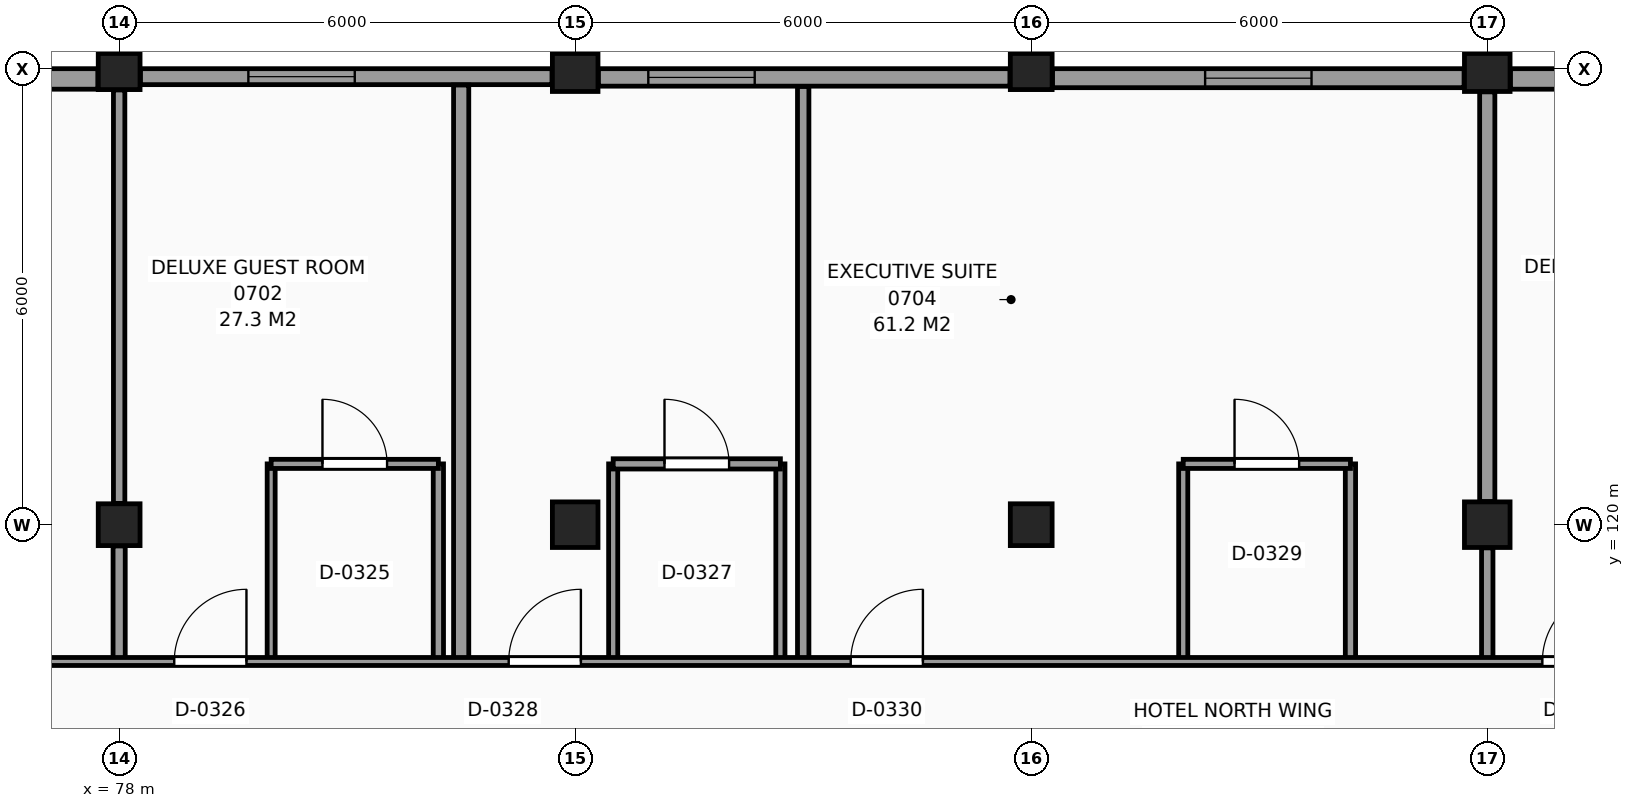
"""IFC4 building model, lengths in metres.
Left out: names, types, materials, properties, quantities, classifications, styles, units other than length and angle.
Written with IfcOpenShell. Run it as: python <this file> out.ifc"""

import sys

from ifc_helpers import new_model, si_unit, direction, frame, frame_2d, origin, origin_2d, place, context, subcontext, project, spatial, rectangle, extrude, element, fill, save


model = new_model("IFC4")
c1 = context("Model", 3, precision=1e-05, world=origin(), true_north=direction((0.0, 1.0)))
c2 = subcontext(c1, "Body", "Model", "MODEL_VIEW")
j1 = project(units=[si_unit("LENGTHUNIT", "METRE"), si_unit("PLANEANGLEUNIT", "RADIAN")], contexts=[c1])
p1 = place(None, origin())
s1 = spatial("IfcSite", under=j1, at=p1, CompositionType="ELEMENT")
p2 = place(p1, origin())
s2 = spatial("IfcBuilding", under=s1, at=p2, CompositionType="ELEMENT")
p3 = place(p2, frame((0.0, 0.0, 31.5)))
s3 = spatial("IfcBuildingStorey", under=s2, at=p3, CompositionType="ELEMENT", Elevation=31.5)
for number, where, z_axis, x_axis in (
    (1, (78.0, 120.0, 0.0), (0.0, 0.0, 1.0), (1.0, 0.0, 0.0)),
    (2, (78.0, 126.0, 0.0), (0.0, 0.0, 1.0), (1.0, 0.0, 0.0)),
):
    element("IfcColumn", number, at=place(p3, frame(where, z_axis=z_axis, x_axis=x_axis)), inside=s3, PredefinedType="COLUMN", context=c2, shape_type="SweptSolid", body=[
        extrude(rectangle(XDim=0.55, YDim=0.55, at=origin_2d()), origin(), (0.0, 0.0, 1.0), 3.3),
    ])
for number, where, z_axis, x_axis in (
    (3, (84.0, 120.0, 0.0), (0.0, 0.0, 1.0), (1.0, 0.0, 0.0)),
    (4, (84.0, 126.0, 0.0), (0.0, 0.0, 1.0), (1.0, 0.0, 0.0)),
):
    element("IfcColumn", number, at=place(p3, frame(where, z_axis=z_axis, x_axis=x_axis)), inside=s3, PredefinedType="COLUMN", context=c2, shape_type="SweptSolid", body=[
        extrude(rectangle(XDim=0.6, YDim=0.6, at=origin_2d()), origin(), (0.0, 0.0, 1.0), 3.3),
    ])
for number, where, z_axis, x_axis in (
    (5, (90.0, 120.0, 0.0), (0.0, 0.0, 1.0), (1.0, 0.0, 0.0)),
    (6, (90.0, 126.0, 0.0), (0.0, 0.0, 1.0), (1.0, 0.0, 0.0)),
):
    element("IfcColumn", number, at=place(p3, frame(where, z_axis=z_axis, x_axis=x_axis)), inside=s3, PredefinedType="COLUMN", context=c2, shape_type="SweptSolid", body=[
        extrude(rectangle(XDim=0.55, YDim=0.55, at=origin_2d()), origin(), (0.0, 0.0, 1.0), 3.3),
    ])
for number, where, z_axis, x_axis in (
    (7, (96.0, 120.0, 0.0), (0.0, 0.0, 1.0), (1.0, 0.0, 0.0)),
    (8, (96.0, 126.0, 0.0), (0.0, 0.0, 1.0), (1.0, 0.0, 0.0)),
):
    element("IfcColumn", number, at=place(p3, frame(where, z_axis=z_axis, x_axis=x_axis)), inside=s3, PredefinedType="COLUMN", context=c2, shape_type="SweptSolid", body=[
        extrude(rectangle(XDim=0.6, YDim=0.6, at=origin_2d()), origin(), (0.0, 0.0, 1.0), 3.3),
    ])
p4 = place(p3, frame((101.72, 125.865, 0.0), z_axis=(0.0, 0.0, 1.0), x_axis=(-1.0, 0.0, 0.0)))
e9 = element("IfcWall", 9, at=p4, inside=s3, PredefinedType="SOLIDWALL", context=c2, shape_type="SweptSolid", body=[
    extrude(rectangle(XDim=5.415, YDim=0.27, at=frame_2d((2.708, 0.0))), origin(), (0.0, 0.0, 1.0), 2.42),
])
p5 = place(p4, frame((2.608, 0.0, 0.8)))
e10 = element("IfcOpeningElement", 10, at=p5, cuts=e9, PredefinedType="OPENING", context=c2, shape_type="SweptSolid", body=[
    extrude(rectangle(XDim=1.4, YDim=1.4, at=frame_2d((0.7, 0.7))), frame((0.0, 0.145, 0.0), z_axis=(0.0, -1.0, 0.0), x_axis=(1.0, 0.0, 0.0)), (0.0, 0.0, 1.0), 0.29),
])
p6 = place(p3, frame((95.695, 125.875, 0.0), z_axis=(0.0, 0.0, 1.0), x_axis=(-1.0, 0.0, 0.0)))
e11 = element("IfcWall", 11, at=p6, inside=s3, PredefinedType="SOLIDWALL", context=c2, shape_type="SweptSolid", body=[
    extrude(rectangle(XDim=5.415, YDim=0.25, at=frame_2d((2.708, 0.0))), origin(), (0.0, 0.0, 1.0), 2.42),
])
p7 = place(p6, frame((2.007, 0.0, 0.8)))
e12 = element("IfcOpeningElement", 12, at=p7, cuts=e11, PredefinedType="OPENING", context=c2, shape_type="SweptSolid", body=[
    extrude(rectangle(XDim=1.4, YDim=1.4, at=frame_2d((0.7, 0.7))), frame((0.0, 0.135, 0.0), z_axis=(0.0, -1.0, 0.0), x_axis=(1.0, 0.0, 0.0)), (0.0, 0.0, 1.0), 0.27),
])
p8 = place(p3, frame((89.72, 125.885, 0.0), z_axis=(0.0, 0.0, 1.0), x_axis=(-1.0, 0.0, 0.0)))
e13 = element("IfcWall", 13, at=p8, inside=s3, PredefinedType="SOLIDWALL", context=c2, shape_type="SweptSolid", body=[
    extrude(rectangle(XDim=5.415, YDim=0.23, at=frame_2d((2.708, 0.0))), origin(), (0.0, 0.0, 1.0), 2.42),
])
p9 = place(p8, frame((3.358, 0.0, 0.8)))
e14 = element("IfcOpeningElement", 14, at=p9, cuts=e13, PredefinedType="OPENING", context=c2, shape_type="SweptSolid", body=[
    extrude(rectangle(XDim=1.4, YDim=1.4, at=frame_2d((0.7, 0.7))), frame((0.0, 0.125, 0.0), z_axis=(0.0, -1.0, 0.0), x_axis=(1.0, 0.0, 0.0)), (0.0, 0.0, 1.0), 0.25),
])
p10 = place(p3, frame((83.695, 125.895, 0.0), z_axis=(0.0, 0.0, 1.0), x_axis=(-1.0, 0.0, 0.0)))
e15 = element("IfcWall", 15, at=p10, inside=s3, PredefinedType="SOLIDWALL", context=c2, shape_type="SweptSolid", body=[
    extrude(rectangle(XDim=5.415, YDim=0.21, at=frame_2d((2.708, 0.0))), origin(), (0.0, 0.0, 1.0), 2.42),
])
p11 = place(p10, frame((2.595, 0.0, 0.8)))
e16 = element("IfcOpeningElement", 16, at=p11, cuts=e15, PredefinedType="OPENING", context=c2, shape_type="SweptSolid", body=[
    extrude(rectangle(XDim=1.4, YDim=1.4, at=frame_2d((0.7, 0.7))), frame((0.0, 0.115, 0.0), z_axis=(0.0, -1.0, 0.0), x_axis=(1.0, 0.0, 0.0)), (0.0, 0.0, 1.0), 0.23),
])
p12 = place(p3, frame((77.72, 125.865, 0.0), z_axis=(0.0, 0.0, 1.0), x_axis=(-1.0, 0.0, 0.0)))
e17 = element("IfcWall", 17, at=p12, inside=s3, PredefinedType="SOLIDWALL", context=c2, shape_type="SweptSolid", body=[
    extrude(rectangle(XDim=5.415, YDim=0.27, at=frame_2d((2.708, 0.0))), origin(), (0.0, 0.0, 1.0), 2.42),
])
p13 = place(p12, frame((2.007, 0.0, 0.8)))
e18 = element("IfcOpeningElement", 18, at=p13, cuts=e17, PredefinedType="OPENING", context=c2, shape_type="SweptSolid", body=[
    extrude(rectangle(XDim=1.4, YDim=1.4, at=frame_2d((0.7, 0.7))), frame((0.0, 0.145, 0.0), z_axis=(0.0, -1.0, 0.0), x_axis=(1.0, 0.0, 0.0)), (0.0, 0.0, 1.0), 0.29),
])
p14 = place(p3, frame((78.0, 118.2, 0.0), z_axis=(0.0, 0.0, 1.0), x_axis=(0.0, 1.0, 0.0)))
e19 = element("IfcWall", 19, at=p14, inside=s3, PredefinedType="PARTITIONING", context=c2, shape_type="SweptSolid", body=[
    extrude(rectangle(XDim=1.52, YDim=0.16, at=frame_2d((0.76, 0.0))), origin(), (0.0, 0.0, 1.0), 2.52),
])
p15 = place(p3, frame((78.0, 120.28, 0.0), z_axis=(0.0, 0.0, 1.0), x_axis=(0.0, 1.0, 0.0)))
e20 = element("IfcWall", 20, at=p15, inside=s3, PredefinedType="PARTITIONING", context=c2, shape_type="SweptSolid", body=[
    extrude(rectangle(XDim=5.44, YDim=0.15, at=frame_2d((2.72, 0.0))), origin(), (0.0, 0.0, 1.0), 2.57),
])
p16 = place(p3, frame((80.0, 118.2, 0.0), z_axis=(0.0, 0.0, 1.0), x_axis=(0.0, 1.0, 0.0)))
e21 = element("IfcWall", 21, at=p16, inside=s3, PredefinedType="PARTITIONING", context=c2, shape_type="SweptSolid", body=[
    extrude(rectangle(XDim=2.6, YDim=0.105, at=frame_2d((1.3, 0.0))), origin(), (0.0, 0.0, 1.0), 3.07),
])
p17 = place(p3, frame((82.2, 118.2, 0.0), z_axis=(0.0, 0.0, 1.0), x_axis=(0.0, 1.0, 0.0)))
e22 = element("IfcWall", 22, at=p17, inside=s3, PredefinedType="PARTITIONING", context=c2, shape_type="SweptSolid", body=[
    extrude(rectangle(XDim=2.6, YDim=0.135, at=frame_2d((1.3, 0.0))), origin(), (0.0, 0.0, 1.0), 3.07),
])
p18 = place(p3, frame((82.5, 118.2, 0.0), z_axis=(0.0, 0.0, 1.0), x_axis=(0.0, 1.0, 0.0)))
e23 = element("IfcWall", 23, at=p18, inside=s3, PredefinedType="PARTITIONING", context=c2, shape_type="SweptSolid", body=[
    extrude(rectangle(XDim=7.585, YDim=0.2, at=frame_2d((3.792, 0.0))), origin(), (0.0, 0.0, 1.0), 3.07),
])
for number, where, z_axis, x_axis in (
    (24, (84.5, 118.2, 0.0), (0.0, 0.0, 1.0), (0.0, 1.0, 0.0)),
    (25, (86.7, 118.2, 0.0), (0.0, 0.0, 1.0), (0.0, 1.0, 0.0)),
):
    element("IfcWall", number, at=place(p3, frame(where, z_axis=z_axis, x_axis=x_axis)), inside=s3, PredefinedType="PARTITIONING", context=c2, shape_type="SweptSolid", body=[
        extrude(rectangle(XDim=2.6, YDim=0.12, at=frame_2d((1.3, 0.0))), origin(), (0.0, 0.0, 1.0), 3.07),
    ])
p19 = place(p3, frame((87.0, 118.2, 0.0), z_axis=(0.0, 0.0, 1.0), x_axis=(0.0, 1.0, 0.0)))
e26 = element("IfcWall", 26, at=p19, inside=s3, PredefinedType="PARTITIONING", context=c2, shape_type="SweptSolid", body=[
    extrude(rectangle(XDim=7.565, YDim=0.15, at=frame_2d((3.782, 0.0))), origin(), (0.0, 0.0, 1.0), 3.07),
])
p20 = place(p3, frame((92.0, 118.2, 0.0), z_axis=(0.0, 0.0, 1.0), x_axis=(0.0, 1.0, 0.0)))
e27 = element("IfcWall", 27, at=p20, inside=s3, PredefinedType="PARTITIONING", context=c2, shape_type="SweptSolid", body=[
    extrude(rectangle(XDim=2.6, YDim=0.12, at=frame_2d((1.3, 0.0))), origin(), (0.0, 0.0, 1.0), 3.07),
])
p21 = place(p3, frame((94.2, 118.2, 0.0), z_axis=(0.0, 0.0, 1.0), x_axis=(0.0, 1.0, 0.0)))
e28 = element("IfcWall", 28, at=p21, inside=s3, PredefinedType="PARTITIONING", context=c2, shape_type="SweptSolid", body=[
    extrude(rectangle(XDim=2.6, YDim=0.135, at=frame_2d((1.3, 0.0))), origin(), (0.0, 0.0, 1.0), 3.07),
])
p22 = place(p3, frame((96.0, 118.2, 0.0), z_axis=(0.0, 0.0, 1.0), x_axis=(0.0, 1.0, 0.0)))
e29 = element("IfcWall", 29, at=p22, inside=s3, PredefinedType="PARTITIONING", context=c2, shape_type="SweptSolid", body=[
    extrude(rectangle(XDim=1.495, YDim=0.15, at=frame_2d((0.748, 0.0))), origin(), (0.0, 0.0, 1.0), 2.27),
])
p23 = place(p3, frame((96.0, 120.305, 0.0), z_axis=(0.0, 0.0, 1.0), x_axis=(0.0, 1.0, 0.0)))
e30 = element("IfcWall", 30, at=p23, inside=s3, PredefinedType="PARTITIONING", context=c2, shape_type="SweptSolid", body=[
    extrude(rectangle(XDim=5.39, YDim=0.2, at=frame_2d((2.695, 0.0))), origin(), (0.0, 0.0, 1.0), 2.27),
])
p24 = place(p3, frame((66.215, 118.2, 0.0), z_axis=(0.0, 0.0, 1.0), x_axis=(1.0, 0.0, 0.0)))
e31 = element("IfcWall", 31, at=p24, inside=s3, PredefinedType="PARTITIONING", context=c2, shape_type="SweptSolid", body=[
    extrude(rectangle(XDim=110.285, YDim=0.105, at=frame_2d((55.143, 0.0))), origin(), (0.0, 0.0, 1.0), 3.07),
])
p25 = place(p24, frame((8.36, 0.0, 0.0)))
e32 = element("IfcOpeningElement", 32, at=p25, cuts=e31, PredefinedType="OPENING", context=c2, shape_type="SweptSolid", body=[
    extrude(rectangle(XDim=0.95, YDim=2.1, at=frame_2d((0.475, 1.05))), frame((0.0, 0.062, 0.0), z_axis=(0.0, -1.0, 0.0), x_axis=(1.0, 0.0, 0.0)), (0.0, 0.0, 1.0), 0.125),
])
p26 = place(p24, frame((12.51, 0.0, 0.0)))
e33 = element("IfcOpeningElement", 33, at=p26, cuts=e31, PredefinedType="OPENING", context=c2, shape_type="SweptSolid", body=[
    extrude(rectangle(XDim=0.95, YDim=2.1, at=frame_2d((0.475, 1.05))), frame((0.0, 0.062, 0.0), z_axis=(0.0, -1.0, 0.0), x_axis=(1.0, 0.0, 0.0)), (0.0, 0.0, 1.0), 0.125),
])
p27 = place(p24, frame((16.91, 0.0, 0.0)))
e34 = element("IfcOpeningElement", 34, at=p27, cuts=e31, PredefinedType="OPENING", context=c2, shape_type="SweptSolid", body=[
    extrude(rectangle(XDim=0.95, YDim=2.1, at=frame_2d((0.475, 1.05))), frame((0.0, 0.062, 0.0), z_axis=(0.0, -1.0, 0.0), x_axis=(1.0, 0.0, 0.0)), (0.0, 0.0, 1.0), 0.125),
])
p28 = place(p24, frame((21.41, 0.0, 0.0)))
e35 = element("IfcOpeningElement", 35, at=p28, cuts=e31, PredefinedType="OPENING", context=c2, shape_type="SweptSolid", body=[
    extrude(rectangle(XDim=0.95, YDim=2.1, at=frame_2d((0.475, 1.05))), frame((0.0, 0.062, 0.0), z_axis=(0.0, -1.0, 0.0), x_axis=(1.0, 0.0, 0.0)), (0.0, 0.0, 1.0), 0.125),
])
p29 = place(p24, frame((30.51, 0.0, 0.0)))
e36 = element("IfcOpeningElement", 36, at=p29, cuts=e31, PredefinedType="OPENING", context=c2, shape_type="SweptSolid", body=[
    extrude(rectangle(XDim=0.95, YDim=2.1, at=frame_2d((0.475, 1.05))), frame((0.0, 0.062, 0.0), z_axis=(0.0, -1.0, 0.0), x_axis=(1.0, 0.0, 0.0)), (0.0, 0.0, 1.0), 0.125),
])
p30 = place(p24, frame((34.91, 0.0, 0.0)))
e37 = element("IfcOpeningElement", 37, at=p30, cuts=e31, PredefinedType="OPENING", context=c2, shape_type="SweptSolid", body=[
    extrude(rectangle(XDim=0.95, YDim=2.1, at=frame_2d((0.475, 1.05))), frame((0.0, 0.062, 0.0), z_axis=(0.0, -1.0, 0.0), x_axis=(1.0, 0.0, 0.0)), (0.0, 0.0, 1.0), 0.125),
])
p31 = place(p24, frame((42.11, 0.0, 0.0)))
e38 = element("IfcOpeningElement", 38, at=p31, cuts=e31, PredefinedType="OPENING", context=c2, shape_type="SweptSolid", body=[
    extrude(rectangle(XDim=0.95, YDim=2.1, at=frame_2d((0.475, 1.05))), frame((0.0, 0.062, 0.0), z_axis=(0.0, -1.0, 0.0), x_axis=(1.0, 0.0, 0.0)), (0.0, 0.0, 1.0), 0.125),
])
p32 = place(p24, frame((50.36, 0.0, 0.0)))
e39 = element("IfcOpeningElement", 39, at=p32, cuts=e31, PredefinedType="OPENING", context=c2, shape_type="SweptSolid", body=[
    extrude(rectangle(XDim=0.95, YDim=2.1, at=frame_2d((0.475, 1.05))), frame((0.0, 0.062, 0.0), z_axis=(0.0, -1.0, 0.0), x_axis=(1.0, 0.0, 0.0)), (0.0, 0.0, 1.0), 0.125),
])
p33 = place(p24, frame((62.36, 0.0, 0.0)))
e40 = element("IfcOpeningElement", 40, at=p33, cuts=e31, PredefinedType="OPENING", context=c2, shape_type="SweptSolid", body=[
    extrude(rectangle(XDim=0.95, YDim=2.1, at=frame_2d((0.475, 1.05))), frame((0.0, 0.062, 0.0), z_axis=(0.0, -1.0, 0.0), x_axis=(1.0, 0.0, 0.0)), (0.0, 0.0, 1.0), 0.125),
])
p34 = place(p24, frame((64.91, 0.0, 0.0)))
e41 = element("IfcOpeningElement", 41, at=p34, cuts=e31, PredefinedType="OPENING", context=c2, shape_type="SweptSolid", body=[
    extrude(rectangle(XDim=0.95, YDim=2.1, at=frame_2d((0.475, 1.05))), frame((0.0, 0.062, 0.0), z_axis=(0.0, -1.0, 0.0), x_axis=(1.0, 0.0, 0.0)), (0.0, 0.0, 1.0), 0.125),
])
p35 = place(p24, frame((72.11, 0.0, 0.0)))
e42 = element("IfcOpeningElement", 42, at=p35, cuts=e31, PredefinedType="OPENING", context=c2, shape_type="SweptSolid", body=[
    extrude(rectangle(XDim=0.95, YDim=2.1, at=frame_2d((0.475, 1.05))), frame((0.0, 0.062, 0.0), z_axis=(0.0, -1.0, 0.0), x_axis=(1.0, 0.0, 0.0)), (0.0, 0.0, 1.0), 0.125),
])
p36 = place(p24, frame((76.31, 0.0, 0.0)))
e43 = element("IfcOpeningElement", 43, at=p36, cuts=e31, PredefinedType="OPENING", context=c2, shape_type="SweptSolid", body=[
    extrude(rectangle(XDim=0.95, YDim=2.1, at=frame_2d((0.475, 1.05))), frame((0.0, 0.062, 0.0), z_axis=(0.0, -1.0, 0.0), x_axis=(1.0, 0.0, 0.0)), (0.0, 0.0, 1.0), 0.125),
])
p37 = place(p24, frame((78.51, 0.0, 0.0)))
e44 = element("IfcOpeningElement", 44, at=p37, cuts=e31, PredefinedType="OPENING", context=c2, shape_type="SweptSolid", body=[
    extrude(rectangle(XDim=0.95, YDim=2.1, at=frame_2d((0.475, 1.05))), frame((0.0, 0.062, 0.0), z_axis=(0.0, -1.0, 0.0), x_axis=(1.0, 0.0, 0.0)), (0.0, 0.0, 1.0), 0.125),
])
p38 = place(p24, frame((84.51, 0.0, 0.0)))
e45 = element("IfcOpeningElement", 45, at=p38, cuts=e31, PredefinedType="OPENING", context=c2, shape_type="SweptSolid", body=[
    extrude(rectangle(XDim=0.95, YDim=2.1, at=frame_2d((0.475, 1.05))), frame((0.0, 0.062, 0.0), z_axis=(0.0, -1.0, 0.0), x_axis=(1.0, 0.0, 0.0)), (0.0, 0.0, 1.0), 0.125),
])
p39 = place(p24, frame((98.36, 0.0, 0.0)))
e46 = element("IfcOpeningElement", 46, at=p39, cuts=e31, PredefinedType="OPENING", context=c2, shape_type="SweptSolid", body=[
    extrude(rectangle(XDim=0.95, YDim=2.1, at=frame_2d((0.475, 1.05))), frame((0.0, 0.062, 0.0), z_axis=(0.0, -1.0, 0.0), x_axis=(1.0, 0.0, 0.0)), (0.0, 0.0, 1.0), 0.125),
])
p40 = place(p24, frame((104.26, 0.0, 0.0)))
e47 = element("IfcOpeningElement", 47, at=p40, cuts=e31, PredefinedType="OPENING", context=c2, shape_type="SweptSolid", body=[
    extrude(rectangle(XDim=0.95, YDim=2.1, at=frame_2d((0.475, 1.05))), frame((0.0, 0.062, 0.0), z_axis=(0.0, -1.0, 0.0), x_axis=(1.0, 0.0, 0.0)), (0.0, 0.0, 1.0), 0.125),
])
p41 = place(p3, frame((80.0, 120.8, 0.0), z_axis=(0.0, 0.0, 1.0), x_axis=(1.0, 0.0, 0.0)))
e48 = element("IfcWall", 48, at=p41, inside=s3, PredefinedType="PARTITIONING", context=c2, shape_type="SweptSolid", body=[
    extrude(rectangle(XDim=2.2, YDim=0.12, at=frame_2d((1.1, 0.0))), origin(), (0.0, 0.0, 1.0), 3.07),
])
p42 = place(p41, frame((0.675, 0.0, 0.0)))
e49 = element("IfcOpeningElement", 49, at=p42, cuts=e48, PredefinedType="OPENING", context=c2, shape_type="SweptSolid", body=[
    extrude(rectangle(XDim=0.85, YDim=2.1, at=frame_2d((0.425, 1.05))), frame((0.0, 0.07, 0.0), z_axis=(0.0, -1.0, 0.0), x_axis=(1.0, 0.0, 0.0)), (0.0, 0.0, 1.0), 0.14),
])
p43 = place(p3, frame((84.5, 120.8, 0.0), z_axis=(0.0, 0.0, 1.0), x_axis=(1.0, 0.0, 0.0)))
e50 = element("IfcWall", 50, at=p43, inside=s3, PredefinedType="PARTITIONING", context=c2, shape_type="SweptSolid", body=[
    extrude(rectangle(XDim=2.2, YDim=0.135, at=frame_2d((1.1, 0.0))), origin(), (0.0, 0.0, 1.0), 3.07),
])
p44 = place(p43, frame((0.675, 0.0, 0.0)))
e51 = element("IfcOpeningElement", 51, at=p44, cuts=e50, PredefinedType="OPENING", context=c2, shape_type="SweptSolid", body=[
    extrude(rectangle(XDim=0.85, YDim=2.1, at=frame_2d((0.425, 1.05))), frame((0.0, 0.078, 0.0), z_axis=(0.0, -1.0, 0.0), x_axis=(1.0, 0.0, 0.0)), (0.0, 0.0, 1.0), 0.155),
])
p45 = place(p3, frame((92.0, 120.8, 0.0), z_axis=(0.0, 0.0, 1.0), x_axis=(1.0, 0.0, 0.0)))
e52 = element("IfcWall", 52, at=p45, inside=s3, PredefinedType="PARTITIONING", context=c2, shape_type="SweptSolid", body=[
    extrude(rectangle(XDim=2.2, YDim=0.12, at=frame_2d((1.1, 0.0))), origin(), (0.0, 0.0, 1.0), 3.07),
])
p46 = place(p45, frame((0.675, 0.0, 0.0)))
e53 = element("IfcOpeningElement", 53, at=p46, cuts=e52, PredefinedType="OPENING", context=c2, shape_type="SweptSolid", body=[
    extrude(rectangle(XDim=0.85, YDim=2.1, at=frame_2d((0.425, 1.05))), frame((0.0, 0.07, 0.0), z_axis=(0.0, -1.0, 0.0), x_axis=(1.0, 0.0, 0.0)), (0.0, 0.0, 1.0), 0.14),
])
p47 = place(p11, origin())
e54 = element("IfcWindow", 54, at=p47, inside=s3, PartitioningType="SINGLE_PANEL", PredefinedType="WINDOW", context=c2, shape_type="SweptSolid", body=[
    extrude(rectangle(XDim=1.4, YDim=1.4, at=frame_2d((0.7, 0.7))), frame((0.0, 0.03, 0.0), z_axis=(0.0, -1.0, 0.0), x_axis=(1.0, 0.0, 0.0)), (0.0, 0.0, 1.0), 0.06),
])
fill(e16, e54)
p48 = place(p9, origin())
e55 = element("IfcWindow", 55, at=p48, inside=s3, PartitioningType="SINGLE_PANEL", PredefinedType="WINDOW", context=c2, shape_type="SweptSolid", body=[
    extrude(rectangle(XDim=1.4, YDim=1.4, at=frame_2d((0.7, 0.7))), frame((0.0, 0.03, 0.0), z_axis=(0.0, -1.0, 0.0), x_axis=(1.0, 0.0, 0.0)), (0.0, 0.0, 1.0), 0.06),
])
fill(e14, e55)
p49 = place(p7, origin())
e56 = element("IfcWindow", 56, at=p49, inside=s3, PartitioningType="SINGLE_PANEL", PredefinedType="WINDOW", context=c2, shape_type="SweptSolid", body=[
    extrude(rectangle(XDim=1.4, YDim=1.4, at=frame_2d((0.7, 0.7))), frame((0.0, 0.03, 0.0), z_axis=(0.0, -1.0, 0.0), x_axis=(1.0, 0.0, 0.0)), (0.0, 0.0, 1.0), 0.06),
])
fill(e12, e56)
p50 = place(p42, origin())
e57 = element("IfcDoor", 57, at=p50, inside=s3, OperationType="SINGLE_SWING_LEFT", PredefinedType="DOOR", context=c2, shape_type="SweptSolid", body=[
    extrude(rectangle(XDim=0.85, YDim=2.1, at=frame_2d((0.425, 1.05))), frame((0.0, 0.025, 0.0), z_axis=(0.0, -1.0, 0.0), x_axis=(1.0, 0.0, 0.0)), (0.0, 0.0, 1.0), 0.05),
])
fill(e49, e57)
p51 = place(p26, origin())
e58 = element("IfcDoor", 58, at=p51, inside=s3, OperationType="SINGLE_SWING_RIGHT", PredefinedType="DOOR", context=c2, shape_type="SweptSolid", body=[
    extrude(rectangle(XDim=0.95, YDim=2.1, at=frame_2d((0.475, 1.05))), frame((0.0, 0.025, 0.0), z_axis=(0.0, -1.0, 0.0), x_axis=(1.0, 0.0, 0.0)), (0.0, 0.0, 1.0), 0.05),
])
fill(e33, e58)
p52 = place(p44, origin())
e59 = element("IfcDoor", 59, at=p52, inside=s3, OperationType="SINGLE_SWING_LEFT", PredefinedType="DOOR", context=c2, shape_type="SweptSolid", body=[
    extrude(rectangle(XDim=0.85, YDim=2.1, at=frame_2d((0.425, 1.05))), frame((0.0, 0.025, 0.0), z_axis=(0.0, -1.0, 0.0), x_axis=(1.0, 0.0, 0.0)), (0.0, 0.0, 1.0), 0.05),
])
fill(e51, e59)
p53 = place(p27, origin())
e60 = element("IfcDoor", 60, at=p53, inside=s3, OperationType="SINGLE_SWING_RIGHT", PredefinedType="DOOR", context=c2, shape_type="SweptSolid", body=[
    extrude(rectangle(XDim=0.95, YDim=2.1, at=frame_2d((0.475, 1.05))), frame((0.0, 0.025, 0.0), z_axis=(0.0, -1.0, 0.0), x_axis=(1.0, 0.0, 0.0)), (0.0, 0.0, 1.0), 0.05),
])
fill(e34, e60)
p54 = place(p46, origin())
e61 = element("IfcDoor", 61, at=p54, inside=s3, OperationType="SINGLE_SWING_LEFT", PredefinedType="DOOR", context=c2, shape_type="SweptSolid", body=[
    extrude(rectangle(XDim=0.85, YDim=2.1, at=frame_2d((0.425, 1.05))), frame((0.0, 0.025, 0.0), z_axis=(0.0, -1.0, 0.0), x_axis=(1.0, 0.0, 0.0)), (0.0, 0.0, 1.0), 0.05),
])
fill(e53, e61)
p55 = place(p28, origin())
e62 = element("IfcDoor", 62, at=p55, inside=s3, OperationType="SINGLE_SWING_RIGHT", PredefinedType="DOOR", context=c2, shape_type="SweptSolid", body=[
    extrude(rectangle(XDim=0.95, YDim=2.1, at=frame_2d((0.475, 1.05))), frame((0.0, 0.025, 0.0), z_axis=(0.0, -1.0, 0.0), x_axis=(1.0, 0.0, 0.0)), (0.0, 0.0, 1.0), 0.05),
])
fill(e35, e62)
p56 = place(p29, origin())
e63 = element("IfcDoor", 63, at=p56, inside=s3, OperationType="SINGLE_SWING_RIGHT", PredefinedType="DOOR", context=c2, shape_type="SweptSolid", body=[
    extrude(rectangle(XDim=0.95, YDim=2.1, at=frame_2d((0.475, 1.05))), frame((0.0, 0.025, 0.0), z_axis=(0.0, -1.0, 0.0), x_axis=(1.0, 0.0, 0.0)), (0.0, 0.0, 1.0), 0.05),
])
fill(e36, e63)
save(model, sys.argv[1])
